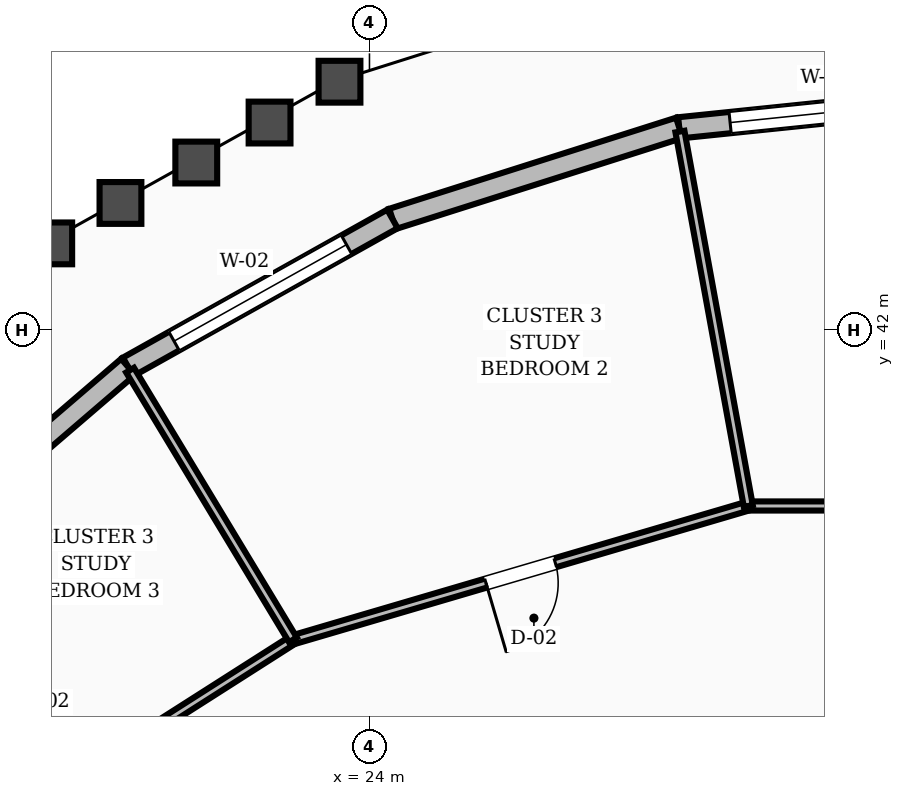
"""IFC4 building model, lengths in metres.
Left out: names, types, materials, properties, quantities, classifications, styles, units other than length and angle.
Written with IfcOpenShell. Run it as: python <this file> out.ifc"""

import sys

from ifc_helpers import new_model, si_unit, direction, frame, frame_2d, origin, place, context, subcontext, project, spatial, rectangle, extrude, element, fill, save


model = new_model("IFC4")
c1 = context("Model", 3, precision=1e-05, world=origin(), true_north=direction((0.0, 1.0)))
c2 = subcontext(c1, "Body", "Model", "MODEL_VIEW")
j1 = project(units=[si_unit("LENGTHUNIT", "METRE"), si_unit("PLANEANGLEUNIT", "RADIAN")], contexts=[c1])
p1 = place(None, origin())
s1 = spatial("IfcSite", under=j1, at=p1, CompositionType="ELEMENT")
p2 = place(p1, origin())
s2 = spatial("IfcBuilding", under=s1, at=p2, CompositionType="ELEMENT")
p3 = place(p2, frame((0.0, 0.0, 261.6)))
s3 = spatial("IfcBuildingStorey", under=s2, at=p3, CompositionType="ELEMENT", Elevation=261.6)
p4 = place(p3, frame((32.0, 45.061, 0.0), z_axis=(0.0, 0.0, 1.0), x_axis=(-0.994722327851, -0.10260355976, 0.0)))
e1 = element("IfcWall", 1, at=p4, inside=s3, PredefinedType="STANDARD", context=c2, shape_type="SweptSolid", body=[
    extrude(rectangle(XDim=3.945, YDim=0.28, at=frame_2d((1.973, 0.0))), origin(), (0.0, 0.0, 1.0), 2.88),
])
p5 = place(p4, frame((0.673, 0.0, 0.8)))
e2 = element("IfcOpeningElement", 2, at=p5, cuts=e1, PredefinedType="OPENING", context=c2, shape_type="SweptSolid", body=[
    extrude(rectangle(XDim=2.6, YDim=1.65, at=frame_2d((1.3, 0.825))), frame((0.0, 0.15, 0.0), z_axis=(0.0, -1.0, 0.0), x_axis=(1.0, 0.0, 0.0)), (0.0, 0.0, 1.0), 0.3),
])
p6 = place(p3, frame((28.076, 44.656, 0.0), z_axis=(0.0, 0.0, 1.0), x_axis=(-0.953082762893, -0.302709839741, 0.0)))
e3 = element("IfcWall", 3, at=p6, inside=s3, PredefinedType="STANDARD", context=c2, shape_type="SweptSolid", body=[
    extrude(rectangle(XDim=3.959, YDim=0.28, at=frame_2d((1.979, 0.0))), origin(), (0.0, 0.0, 1.0), 2.88),
])
p7 = place(p3, frame((24.302, 43.458, 0.0), z_axis=(0.0, 0.0, 1.0), x_axis=(-0.872627171538, -0.488386956719, 0.0)))
e4 = element("IfcWall", 4, at=p7, inside=s3, PredefinedType="STANDARD", context=c2, shape_type="SweptSolid", body=[
    extrude(rectangle(XDim=3.985, YDim=0.28, at=frame_2d((1.993, 0.0))), origin(), (0.0, 0.0, 1.0), 2.88),
])
p8 = place(p7, frame((0.693, 0.0, 0.8)))
e5 = element("IfcOpeningElement", 5, at=p8, cuts=e4, PredefinedType="OPENING", context=c2, shape_type="SweptSolid", body=[
    extrude(rectangle(XDim=2.6, YDim=1.65, at=frame_2d((1.3, 0.825))), frame((0.0, 0.15, 0.0), z_axis=(0.0, -1.0, 0.0), x_axis=(1.0, 0.0, 0.0)), (0.0, 0.0, 1.0), 0.3),
])
p9 = place(p3, frame((20.825, 41.512, 0.0), z_axis=(0.0, 0.0, 1.0), x_axis=(-0.758458425967, -0.651721425212, 0.0)))
e6 = element("IfcWall", 6, at=p9, inside=s3, PredefinedType="STANDARD", context=c2, shape_type="SweptSolid", body=[
    extrude(rectangle(XDim=4.019, YDim=0.28, at=frame_2d((2.009, 0.0))), origin(), (0.0, 0.0, 1.0), 2.88),
])
p10 = place(p3, frame((35.016, 39.682, 0.0), z_axis=(0.0, 0.0, 1.0), x_axis=(-1.0, 0.0, 0.0)))
e7 = element("IfcWall", 7, at=p10, inside=s3, PredefinedType="PARTITIONING", context=c2, shape_type="SweptSolid", body=[
    extrude(rectangle(XDim=6.032, YDim=0.12, at=frame_2d((3.016, 0.0))), origin(), (0.0, 0.0, 1.0), 2.87),
])
p11 = place(p10, frame((3.465, 0.0, 0.0)))
e8 = element("IfcOpeningElement", 8, at=p11, cuts=e7, PredefinedType="OPENING", context=c2, shape_type="SweptSolid", body=[
    extrude(rectangle(XDim=0.95, YDim=2.1, at=frame_2d((0.475, 1.05))), frame((0.0, 0.07, 0.0), z_axis=(0.0, -1.0, 0.0), x_axis=(1.0, 0.0, 0.0)), (0.0, 0.0, 1.0), 0.14),
])
p12 = place(p3, frame((28.984, 39.682, 0.0), z_axis=(0.0, 0.0, 1.0), x_axis=(-0.959414668212, -0.281999103578, 0.0)))
e9 = element("IfcWall", 9, at=p12, inside=s3, PredefinedType="PARTITIONING", context=c2, shape_type="SweptSolid", body=[
    extrude(rectangle(XDim=6.245, YDim=0.12, at=frame_2d((3.122, 0.0))), origin(), (0.0, 0.0, 1.0), 2.87),
])
p13 = place(p12, frame((2.647, 0.0, 0.0)))
e10 = element("IfcOpeningElement", 10, at=p13, cuts=e9, PredefinedType="OPENING", context=c2, shape_type="SweptSolid", body=[
    extrude(rectangle(XDim=0.95, YDim=2.1, at=frame_2d((0.475, 1.05))), frame((0.0, 0.07, 0.0), z_axis=(0.0, -1.0, 0.0), x_axis=(1.0, 0.0, 0.0)), (0.0, 0.0, 1.0), 0.14),
])
p14 = place(p3, frame((28.984, 39.682, 0.0), z_axis=(0.0, 0.0, 1.0), x_axis=(-0.179623384496, 0.983735452112, 0.0)))
e11 = element("IfcWall", 11, at=p14, inside=s3, PredefinedType="PARTITIONING", context=c2, shape_type="SweptSolid", body=[
    extrude(rectangle(XDim=5.007, YDim=0.12, at=frame_2d((2.504, 0.0))), origin(), (0.0, 0.0, 1.0), 2.87),
])
p15 = place(p3, frame((22.993, 37.921, 0.0), z_axis=(0.0, 0.0, 1.0), x_axis=(-0.843220391553, -0.537568015482, 0.0)))
e12 = element("IfcWall", 12, at=p15, inside=s3, PredefinedType="PARTITIONING", context=c2, shape_type="SweptSolid", body=[
    extrude(rectangle(XDim=6.91, YDim=0.12, at=frame_2d((3.455, 0.0))), origin(), (0.0, 0.0, 1.0), 2.87),
])
p16 = place(p15, frame((2.98, 0.0, 0.0)))
e13 = element("IfcOpeningElement", 13, at=p16, cuts=e12, PredefinedType="OPENING", context=c2, shape_type="SweptSolid", body=[
    extrude(rectangle(XDim=0.95, YDim=2.1, at=frame_2d((0.475, 1.05))), frame((0.0, 0.07, 0.0), z_axis=(0.0, -1.0, 0.0), x_axis=(1.0, 0.0, 0.0)), (0.0, 0.0, 1.0), 0.14),
])
p17 = place(p3, frame((22.993, 37.921, 0.0), z_axis=(0.0, 0.0, 1.0), x_axis=(-0.516901675456, 0.856044775646, 0.0)))
e14 = element("IfcWall", 14, at=p17, inside=s3, PredefinedType="PARTITIONING", context=c2, shape_type="SweptSolid", body=[
    extrude(rectangle(XDim=4.145, YDim=0.12, at=frame_2d((2.073, 0.0))), origin(), (0.0, 0.0, 1.0), 2.87),
])
p18 = place(p5, origin())
e15 = element("IfcWindow", 15, at=p18, inside=s3, PartitioningType="SINGLE_PANEL", PredefinedType="WINDOW", context=c2, shape_type="SweptSolid", body=[
    extrude(rectangle(XDim=2.6, YDim=1.65, at=frame_2d((1.3, 0.825))), frame((0.0, 0.03, 0.0), z_axis=(0.0, -1.0, 0.0), x_axis=(1.0, 0.0, 0.0)), (0.0, 0.0, 1.0), 0.06),
])
fill(e2, e15)
p19 = place(p8, origin())
e16 = element("IfcWindow", 16, at=p19, inside=s3, PartitioningType="SINGLE_PANEL", PredefinedType="WINDOW", context=c2, shape_type="SweptSolid", body=[
    extrude(rectangle(XDim=2.6, YDim=1.65, at=frame_2d((1.3, 0.825))), frame((0.0, 0.03, 0.0), z_axis=(0.0, -1.0, 0.0), x_axis=(1.0, 0.0, 0.0)), (0.0, 0.0, 1.0), 0.06),
])
fill(e5, e16)
p20 = place(p13, origin())
e17 = element("IfcDoor", 17, at=p20, inside=s3, OperationType="SINGLE_SWING_RIGHT", PredefinedType="DOOR", context=c2, shape_type="SweptSolid", body=[
    extrude(rectangle(XDim=0.95, YDim=2.1, at=frame_2d((0.475, 1.05))), frame((0.0, 0.025, 0.0), z_axis=(0.0, -1.0, 0.0), x_axis=(1.0, 0.0, 0.0)), (0.0, 0.0, 1.0), 0.05),
])
fill(e10, e17)
save(model, sys.argv[1])
